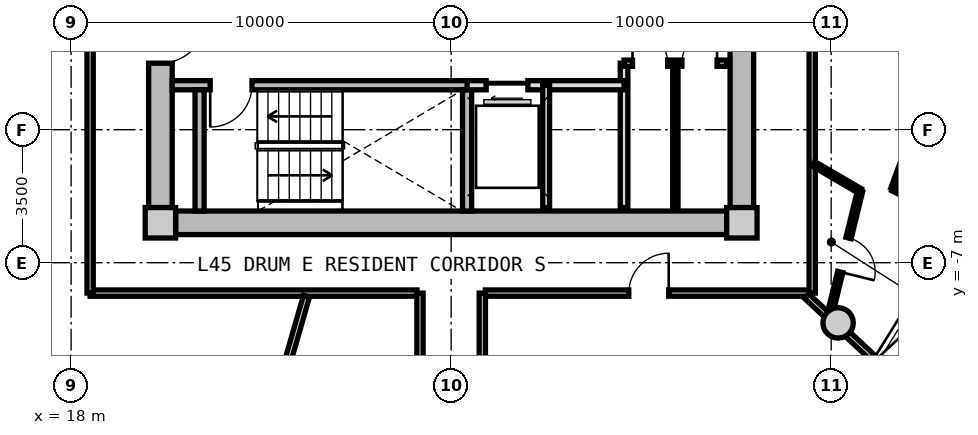
"""IFC4 building model, lengths in metres.
Left out: names, types, materials, properties, quantities, classifications, styles, units other than length and angle.
Written with IfcOpenShell. Run it as: python <this file> out.ifc"""

import sys

from ifc_helpers import new_model, si_unit, direction, frame, frame_2d, origin, origin_2d, place, context, subcontext, project, spatial, rectangle, circle, extrude, source, transform, mapped, element, fill, save


model = new_model("IFC4")
c1 = context("Model", 3, precision=1e-05, world=origin(), true_north=direction((0.0, 1.0)))
c2 = subcontext(c1, "Body", "Model", "MODEL_VIEW")
j1 = project(units=[si_unit("LENGTHUNIT", "METRE"), si_unit("PLANEANGLEUNIT", "RADIAN")], contexts=[c1])
p1 = place(None, origin())
s1 = spatial("IfcSite", under=j1, at=p1, CompositionType="ELEMENT")
p2 = place(p1, origin())
s2 = spatial("IfcBuilding", under=s1, at=p2, CompositionType="ELEMENT")
p3 = place(p2, frame((0.0, 0.0, 146.5)))
s3 = spatial("IfcBuildingStorey", under=s2, at=p3, CompositionType="ELEMENT", Elevation=146.5)
m1 = source(origin(), c2, "Body", "SweptSolid", [
    extrude(rectangle(XDim=0.8, YDim=0.8, at=origin_2d()), origin(), (0.0, 0.0, 1.0), 3.05),
])
for number, where, z_axis, x_axis in (
    (1, (20.35, -5.95, 0.0), (0.0, 0.0, 1.0), (1.0, 0.0, 0.0)),
    (2, (35.65, -5.95, 0.0), (0.0, 0.0, 1.0), (1.0, 0.0, 0.0)),
):
    element("IfcColumn", number, at=place(p3, frame(where, z_axis=z_axis, x_axis=x_axis)), inside=s3, PredefinedType="COLUMN", context=c2, shape_type="MappedRepresentation", body=[
        mapped(m1, transform((0.0, 0.0, 0.0), x_axis=(1.0, 0.0, 0.0), y_axis=(0.0, 1.0, 0.0), z_axis=(0.0, 0.0, 1.0), scale=1.0)),
    ])
m2 = source(origin(), c2, "Body", "SweptSolid", [
    extrude(rectangle(XDim=14.5, YDim=0.62, at=frame_2d((7.25, 0.0))), origin(), (0.0, 0.0, 1.0), 2.81),
])
p4 = place(p3, frame((35.25, -5.95, 0.0), z_axis=(0.0, 0.0, 1.0), x_axis=(-1.0, 0.0, 0.0)))
e3 = element("IfcWall", 3, at=p4, inside=s3, PredefinedType="SHEAR", context=c2, shape_type="MappedRepresentation", body=[
    mapped(m2, transform((0.0, 0.0, 0.0), x_axis=(1.0, 0.0, 0.0), y_axis=(0.0, 1.0, 0.0), z_axis=(0.0, 0.0, 1.0), scale=1.0)),
])
m3 = source(origin(), c2, "Body", "SweptSolid", [
    extrude(rectangle(XDim=11.1, YDim=0.62, at=frame_2d((5.55, 0.0))), origin(), (0.0, 0.0, 1.0), 2.81),
])
p5 = place(p3, frame((20.35, -5.55, 0.0), z_axis=(0.0, 0.0, 1.0), x_axis=(0.0, 1.0, 0.0)))
e4 = element("IfcWall", 4, at=p5, inside=s3, PredefinedType="SHEAR", context=c2, shape_type="MappedRepresentation", body=[
    mapped(m3, transform((0.0, 0.0, 0.0), x_axis=(1.0, 0.0, 0.0), y_axis=(0.0, 1.0, 0.0), z_axis=(0.0, 0.0, 1.0), scale=1.0)),
])
p6 = place(p5, frame((3.8, 0.0, 0.0)))
e5 = element("IfcOpeningElement", 5, at=p6, cuts=e4, PredefinedType="OPENING", context=c2, shape_type="SweptSolid", body=[
    extrude(rectangle(XDim=1.2, YDim=2.15, at=frame_2d((0.6, 1.075))), frame((0.0, 0.32, 0.0), z_axis=(0.0, -1.0, 0.0), x_axis=(1.0, 0.0, 0.0)), (0.0, 0.0, 1.0), 0.64),
])
p7 = place(p3, frame((35.65, 5.55, 0.0), z_axis=(0.0, 0.0, 1.0), x_axis=(0.0, -1.0, 0.0)))
e6 = element("IfcWall", 6, at=p7, inside=s3, PredefinedType="SHEAR", context=c2, shape_type="MappedRepresentation", body=[
    mapped(m3, transform((0.0, 0.0, 0.0), x_axis=(1.0, 0.0, 0.0), y_axis=(0.0, 1.0, 0.0), z_axis=(0.0, 0.0, 1.0), scale=1.0)),
])
p8 = place(p7, frame((5.65, 0.0, 0.0)))
e7 = element("IfcOpeningElement", 7, at=p8, cuts=e6, PredefinedType="OPENING", context=c2, shape_type="SweptSolid", body=[
    extrude(rectangle(XDim=1.2, YDim=2.15, at=frame_2d((0.6, 1.075))), frame((0.0, 0.32, 0.0), z_axis=(0.0, -1.0, 0.0), x_axis=(1.0, 0.0, 0.0)), (0.0, 0.0, 1.0), 0.64),
])
m4 = source(origin(), c2, "Body", "SweptSolid", [
    extrude(circle(Radius=0.4, at=origin_2d()), origin(), (0.0, 0.0, 1.0), 3.05),
])
p9 = place(p3, frame((38.183, -8.584, 0.0), z_axis=(0.0, 0.0, 1.0), x_axis=(1.0, 0.0, 0.0)))
e8 = element("IfcColumn", 8, at=p9, inside=s3, PredefinedType="COLUMN", context=c2, shape_type="MappedRepresentation", body=[
    mapped(m4, transform((0.0, 0.0, 0.0), x_axis=(1.0, 0.0, 0.0), y_axis=(0.0, 1.0, 0.0), z_axis=(0.0, 0.0, 1.0), scale=1.0)),
])
m5 = source(origin(), c2, "Body", "SweptSolid", [
    extrude(rectangle(XDim=7.88, YDim=0.24, at=frame_2d((3.94, 0.0))), origin(), (0.0, 0.0, 1.0), 2.81),
])
p10 = place(p3, frame((20.66, -2.33, 0.0), z_axis=(0.0, 0.0, 1.0), x_axis=(1.0, 0.0, 0.0)))
e9 = element("IfcWall", 9, at=p10, inside=s3, PredefinedType="PARTITIONING", context=c2, shape_type="MappedRepresentation", body=[
    mapped(m5, transform((0.0, 0.0, 0.0), x_axis=(1.0, 0.0, 0.0), y_axis=(0.0, 1.0, 0.0), z_axis=(0.0, 0.0, 1.0), scale=1.0)),
])
p11 = place(p10, frame((1.0, 0.0, 0.0)))
e10 = element("IfcOpeningElement", 10, at=p11, cuts=e9, PredefinedType="OPENING", context=c2, shape_type="SweptSolid", body=[
    extrude(rectangle(XDim=1.1, YDim=2.15, at=frame_2d((0.55, 1.075))), frame((0.0, 0.13, 0.0), z_axis=(0.0, -1.0, 0.0), x_axis=(1.0, 0.0, 0.0)), (0.0, 0.0, 1.0), 0.26),
])
m6 = source(origin(), c2, "Body", "SweptSolid", [
    extrude(rectangle(XDim=3.19, YDim=0.24, at=frame_2d((1.595, 0.0))), origin(), (0.0, 0.0, 1.0), 2.81),
])
for number, where, z_axis, x_axis in (
    (11, (21.38, -5.64, 0.0), (0.0, 0.0, 1.0), (0.0, 1.0, 0.0)),
    (12, (28.42, -5.64, 0.0), (0.0, 0.0, 1.0), (0.0, 1.0, 0.0)),
):
    element("IfcWall", number, at=place(p3, frame(where, z_axis=z_axis, x_axis=x_axis)), inside=s3, PredefinedType="PARTITIONING", context=c2, shape_type="MappedRepresentation", body=[
        mapped(m6, transform((0.0, 0.0, 0.0), x_axis=(1.0, 0.0, 0.0), y_axis=(0.0, 1.0, 0.0), z_axis=(0.0, 0.0, 1.0), scale=1.0)),
    ])
m7 = source(origin(), c2, "Body", "SweptSolid", [
    extrude(rectangle(XDim=3.8, YDim=0.2, at=frame_2d((1.9, 0.0))), origin(), (0.0, 0.0, 1.0), 2.795),
])
p12 = place(p3, frame((32.55, -5.55, 0.0), z_axis=(0.0, 0.0, 1.0), x_axis=(0.0, 1.0, 0.0)))
e13 = element("IfcWall", 13, at=p12, inside=s3, PredefinedType="PARTITIONING", context=c2, shape_type="MappedRepresentation", body=[
    mapped(m7, transform((0.0, 0.0, 0.0), x_axis=(1.0, 0.0, 0.0), y_axis=(0.0, 1.0, 0.0), z_axis=(0.0, 0.0, 1.0), scale=1.0)),
])
m8 = source(origin(), c2, "Body", "SweptSolid", [
    extrude(rectangle(XDim=4.13, YDim=0.24, at=frame_2d((2.065, 0.0))), origin(), (0.0, 0.0, 1.0), 2.795),
])
p13 = place(p3, frame((28.42, -2.33, 0.0), z_axis=(0.0, 0.0, 1.0), x_axis=(1.0, 0.0, 0.0)))
e14 = element("IfcWall", 14, at=p13, inside=s3, PredefinedType="PARTITIONING", context=c2, shape_type="MappedRepresentation", body=[
    mapped(m8, transform((0.0, 0.0, 0.0), x_axis=(1.0, 0.0, 0.0), y_axis=(0.0, 1.0, 0.0), z_axis=(0.0, 0.0, 1.0), scale=1.0)),
])
p14 = place(p13, frame((0.5, 0.0, 0.0)))
e15 = element("IfcOpeningElement", 15, at=p14, cuts=e14, PredefinedType="OPENING", context=c2, shape_type="SweptSolid", body=[
    extrude(rectangle(XDim=1.1, YDim=2.2, at=frame_2d((0.55, 1.1))), frame((0.0, 0.13, 0.0), z_axis=(0.0, -1.0, 0.0), x_axis=(1.0, 0.0, 0.0)), (0.0, 0.0, 1.0), 0.26),
])
m9 = source(origin(), c2, "Body", "SweptSolid", [
    extrude(rectangle(XDim=3.22, YDim=0.18, at=frame_2d((1.61, 0.0))), origin(), (0.0, 0.0, 1.0), 2.795),
])
p15 = place(p3, frame((30.5, -5.55, 0.0), z_axis=(0.0, 0.0, 1.0), x_axis=(0.0, 1.0, 0.0)))
e16 = element("IfcWall", 16, at=p15, inside=s3, PredefinedType="PARTITIONING", context=c2, shape_type="MappedRepresentation", body=[
    mapped(m9, transform((0.0, 0.0, 0.0), x_axis=(1.0, 0.0, 0.0), y_axis=(0.0, 1.0, 0.0), z_axis=(0.0, 0.0, 1.0), scale=1.0)),
])
m10 = source(origin(), c2, "Body", "SweptSolid", [
    extrude(rectangle(XDim=2.7, YDim=0.165, at=frame_2d((1.35, 0.0))), origin(), (0.0, 0.0, 1.0), 2.795),
])
p16 = place(p3, frame((32.55, -1.75, 0.0), z_axis=(0.0, 0.0, 1.0), x_axis=(1.0, 0.0, 0.0)))
e17 = element("IfcWall", 17, at=p16, inside=s3, PredefinedType="PARTITIONING", context=c2, shape_type="MappedRepresentation", body=[
    mapped(m10, transform((0.0, 0.0, 0.0), x_axis=(1.0, 0.0, 0.0), y_axis=(0.0, 1.0, 0.0), z_axis=(0.0, 0.0, 1.0), scale=1.0)),
])
p17 = place(p16, frame((0.222, 0.0, 0.0)))
e18 = element("IfcOpeningElement", 18, at=p17, cuts=e17, PredefinedType="OPENING", context=c2, shape_type="SweptSolid", body=[
    extrude(rectangle(XDim=0.925, YDim=2.1, at=frame_2d((0.462, 1.05))), frame((0.0, 0.093, 0.0), z_axis=(0.0, -1.0, 0.0), x_axis=(1.0, 0.0, 0.0)), (0.0, 0.0, 1.0), 0.185),
])
p18 = place(p16, frame((1.522, 0.0, 0.0)))
e19 = element("IfcOpeningElement", 19, at=p18, cuts=e17, PredefinedType="OPENING", context=c2, shape_type="SweptSolid", body=[
    extrude(rectangle(XDim=0.925, YDim=2.1, at=frame_2d((0.462, 1.05))), frame((0.0, 0.093, 0.0), z_axis=(0.0, -1.0, 0.0), x_axis=(1.0, 0.0, 0.0)), (0.0, 0.0, 1.0), 0.185),
])
m11 = source(origin(), c2, "Body", "SweptSolid", [
    extrude(rectangle(XDim=3.8, YDim=0.14, at=frame_2d((1.9, 0.0))), origin(), (0.0, 0.0, 1.0), 2.795),
])
p19 = place(p3, frame((33.9, -5.55, 0.0), z_axis=(0.0, 0.0, 1.0), x_axis=(0.0, 1.0, 0.0)))
e20 = element("IfcWall", 20, at=p19, inside=s3, PredefinedType="PARTITIONING", context=c2, shape_type="MappedRepresentation", body=[
    mapped(m11, transform((0.0, 0.0, 0.0), x_axis=(1.0, 0.0, 0.0), y_axis=(0.0, 1.0, 0.0), z_axis=(0.0, 0.0, 1.0), scale=1.0)),
])
m12 = source(origin(), c2, "Body", "SweptSolid", [
    extrude(rectangle(XDim=8.6, YDim=0.165, at=frame_2d((4.3, 0.0))), origin(), (0.0, 0.0, 1.0), 2.795),
])
p20 = place(p3, frame((37.5, -7.8, 0.0), z_axis=(0.0, 0.0, 1.0), x_axis=(-1.0, 0.0, 0.0)))
e21 = element("IfcWall", 21, at=p20, inside=s3, PredefinedType="PARTITIONING", context=c2, shape_type="MappedRepresentation", body=[
    mapped(m12, transform((0.0, 0.0, 0.0), x_axis=(1.0, 0.0, 0.0), y_axis=(0.0, 1.0, 0.0), z_axis=(0.0, 0.0, 1.0), scale=1.0)),
])
p21 = place(p20, frame((3.775, 0.0, 0.0)))
e22 = element("IfcOpeningElement", 22, at=p21, cuts=e21, PredefinedType="OPENING", context=c2, shape_type="SweptSolid", body=[
    extrude(rectangle(XDim=1.05, YDim=2.15, at=frame_2d((0.525, 1.075))), frame((0.0, 0.093, 0.0), z_axis=(0.0, -1.0, 0.0), x_axis=(1.0, 0.0, 0.0)), (0.0, 0.0, 1.0), 0.185),
])
p22 = place(p3, frame((27.1, -7.8, 0.0), z_axis=(0.0, 0.0, 1.0), x_axis=(-1.0, 0.0, 0.0)))
e23 = element("IfcWall", 23, at=p22, inside=s3, PredefinedType="PARTITIONING", context=c2, shape_type="MappedRepresentation", body=[
    mapped(m12, transform((0.0, 0.0, 0.0), x_axis=(1.0, 0.0, 0.0), y_axis=(0.0, 1.0, 0.0), z_axis=(0.0, 0.0, 1.0), scale=1.0)),
])
m13 = source(origin(), c2, "Body", "SweptSolid", [
    extrude(rectangle(XDim=15.6, YDim=0.165, at=frame_2d((7.8, 0.0))), origin(), (0.0, 0.0, 1.0), 2.795),
])
p23 = place(p3, frame((18.5, -7.8, 0.0), z_axis=(0.0, 0.0, 1.0), x_axis=(0.0, 1.0, 0.0)))
e24 = element("IfcWall", 24, at=p23, inside=s3, PredefinedType="PARTITIONING", context=c2, shape_type="MappedRepresentation", body=[
    mapped(m13, transform((0.0, 0.0, 0.0), x_axis=(1.0, 0.0, 0.0), y_axis=(0.0, 1.0, 0.0), z_axis=(0.0, 0.0, 1.0), scale=1.0)),
])
p24 = place(p23, frame((7.175, 0.0, 0.0)))
e25 = element("IfcOpeningElement", 25, at=p24, cuts=e24, PredefinedType="OPENING", context=c2, shape_type="SweptSolid", body=[
    extrude(rectangle(XDim=1.25, YDim=2.2, at=frame_2d((0.625, 1.1))), frame((0.0, 0.093, 0.0), z_axis=(0.0, -1.0, 0.0), x_axis=(1.0, 0.0, 0.0)), (0.0, 0.0, 1.0), 0.185),
])
p25 = place(p3, frame((37.5, 7.8, 0.0), z_axis=(0.0, 0.0, 1.0), x_axis=(0.0, -1.0, 0.0)))
e26 = element("IfcWall", 26, at=p25, inside=s3, PredefinedType="PARTITIONING", context=c2, shape_type="MappedRepresentation", body=[
    mapped(m13, transform((0.0, 0.0, 0.0), x_axis=(1.0, 0.0, 0.0), y_axis=(0.0, 1.0, 0.0), z_axis=(0.0, 0.0, 1.0), scale=1.0)),
])
p26 = place(p25, frame((5.687, 0.0, 0.0)))
e27 = element("IfcOpeningElement", 27, at=p26, cuts=e26, PredefinedType="OPENING", context=c2, shape_type="SweptSolid", body=[
    extrude(rectangle(XDim=1.05, YDim=2.15, at=frame_2d((0.525, 1.075))), frame((0.0, 0.093, 0.0), z_axis=(0.0, -1.0, 0.0), x_axis=(1.0, 0.0, 0.0)), (0.0, 0.0, 1.0), 0.185),
])
m14 = source(origin(), c2, "Body", "SweptSolid", [
    extrude(rectangle(XDim=6.035, YDim=0.165, at=frame_2d((3.018, 0.0))), origin(), (0.0, 0.0, 1.0), 2.345),
])
p27 = place(p3, frame((24.194, -7.88, 0.0), z_axis=(0.0, 0.0, 1.0), x_axis=(-0.276809454862, -0.960924828329, 0.0)))
e28 = element("IfcWall", 28, at=p27, inside=s3, PredefinedType="PARTITIONING", context=c2, shape_type="MappedRepresentation", body=[
    mapped(m14, transform((0.0, 0.0, 0.0), x_axis=(1.0, 0.0, 0.0), y_axis=(0.0, 1.0, 0.0), z_axis=(0.0, 0.0, 1.0), scale=1.0)),
])
m15 = source(origin(), c2, "Body", "SweptSolid", [
    extrude(rectangle(XDim=2.435, YDim=0.165, at=frame_2d((1.217, 0.0))), origin(), (0.0, 0.0, 1.0), 2.345),
])
p28 = place(p3, frame((37.354, -7.88, 0.0), z_axis=(0.0, 0.0, 1.0), x_axis=(0.732164643118, -0.681127693878, 0.0)))
e29 = element("IfcWall", 29, at=p28, inside=s3, PredefinedType="PARTITIONING", context=c2, shape_type="MappedRepresentation", body=[
    mapped(m15, transform((0.0, 0.0, 0.0), x_axis=(1.0, 0.0, 0.0), y_axis=(0.0, 1.0, 0.0), z_axis=(0.0, 0.0, 1.0), scale=1.0)),
])
m16 = source(origin(), c2, "Body", "SweptSolid", [
    extrude(rectangle(XDim=4.685, YDim=0.165, at=frame_2d((2.342, 0.0))), origin(), (0.0, 0.0, 1.0), 2.795),
])
p29 = place(p3, frame((27.18, -12.485, 0.0), z_axis=(0.0, 0.0, 1.0), x_axis=(0.0, 1.0, 0.0)))
e30 = element("IfcWall", 30, at=p29, inside=s3, PredefinedType="PARTITIONING", context=c2, shape_type="MappedRepresentation", body=[
    mapped(m16, transform((0.0, 0.0, 0.0), x_axis=(1.0, 0.0, 0.0), y_axis=(0.0, 1.0, 0.0), z_axis=(0.0, 0.0, 1.0), scale=1.0)),
])
p30 = place(p29, frame((1.817, 0.0, 0.0)))
e31 = element("IfcOpeningElement", 31, at=p30, cuts=e30, PredefinedType="OPENING", context=c2, shape_type="SweptSolid", body=[
    extrude(rectangle(XDim=1.05, YDim=2.15, at=frame_2d((0.525, 1.075))), frame((0.0, 0.093, 0.0), z_axis=(0.0, -1.0, 0.0), x_axis=(1.0, 0.0, 0.0)), (0.0, 0.0, 1.0), 0.185),
])
p31 = place(p3, frame((28.82, -12.485, 0.0), z_axis=(0.0, 0.0, 1.0), x_axis=(0.0, 1.0, 0.0)))
e32 = element("IfcWall", 32, at=p31, inside=s3, PredefinedType="PARTITIONING", context=c2, shape_type="MappedRepresentation", body=[
    mapped(m16, transform((0.0, 0.0, 0.0), x_axis=(1.0, 0.0, 0.0), y_axis=(0.0, 1.0, 0.0), z_axis=(0.0, 0.0, 1.0), scale=1.0)),
])
m17 = source(origin(), c2, "Body", "SweptSolid", [
    extrude(rectangle(XDim=1.425, YDim=0.14, at=frame_2d((0.712, 0.0))), origin(), (0.0, 0.0, 1.0), 2.795),
])
p32 = place(p3, frame((37.53, -4.396, 0.0), z_axis=(0.0, 0.0, 1.0), x_axis=(0.86324395577, -0.50478695786, 0.0)))
e33 = element("IfcWall", 33, at=p32, inside=s3, PredefinedType="PARTITIONING", context=c2, shape_type="MappedRepresentation", body=[
    mapped(m17, transform((0.0, 0.0, 0.0), x_axis=(1.0, 0.0, 0.0), y_axis=(0.0, 1.0, 0.0), z_axis=(0.0, 0.0, 1.0), scale=1.0)),
])
m18 = source(origin(), c2, "Body", "SweptSolid", [
    extrude(rectangle(XDim=3.464, YDim=0.14, at=frame_2d((1.732, 0.0))), origin(), (0.0, 0.0, 1.0), 2.795),
])
p33 = place(p3, frame((38.76, -5.115, 0.0), z_axis=(0.0, 0.0, 1.0), x_axis=(-0.238055968485, -0.971251438027, 0.0)))
e34 = element("IfcWall", 34, at=p33, inside=s3, PredefinedType="PARTITIONING", context=c2, shape_type="MappedRepresentation", body=[
    mapped(m18, transform((0.0, 0.0, 0.0), x_axis=(1.0, 0.0, 0.0), y_axis=(0.0, 1.0, 0.0), z_axis=(0.0, 0.0, 1.0), scale=1.0)),
])
p34 = place(p33, frame((1.272, 0.0, 0.0)))
e35 = element("IfcOpeningElement", 35, at=p34, cuts=e34, PredefinedType="OPENING", context=c2, shape_type="SweptSolid", body=[
    extrude(rectangle(XDim=0.92, YDim=2.1, at=frame_2d((0.46, 1.05))), frame((0.0, 0.08, 0.0), z_axis=(0.0, -1.0, 0.0), x_axis=(1.0, 0.0, 0.0)), (0.0, 0.0, 1.0), 0.16),
])
m19 = source(origin(), c2, "Body", "SweptSolid", [
    extrude(rectangle(XDim=1.957, YDim=0.115, at=frame_2d((0.979, 0.0))), origin(), (0.0, 0.0, 1.0), 2.795),
])
p35 = place(p3, frame((39.623, -5.057, 0.0), z_axis=(0.0, 0.0, 1.0), x_axis=(0.889228358674, -0.45746357902, 0.0)))
e36 = element("IfcWall", 36, at=p35, inside=s3, PredefinedType="PARTITIONING", context=c2, shape_type="MappedRepresentation", body=[
    mapped(m19, transform((0.0, 0.0, 0.0), x_axis=(1.0, 0.0, 0.0), y_axis=(0.0, 1.0, 0.0), z_axis=(0.0, 0.0, 1.0), scale=1.0)),
])
m20 = source(origin(), c2, "Body", "SweptSolid", [
    extrude(rectangle(XDim=3.571, YDim=0.115, at=frame_2d((1.786, 0.0))), origin(), (0.0, 0.0, 1.0), 2.795),
])
p36 = place(p3, frame((39.623, -5.057, 0.0), z_axis=(0.0, 0.0, 1.0), x_axis=(0.343515356993, 0.939147059576, 0.0)))
e37 = element("IfcWall", 37, at=p36, inside=s3, PredefinedType="PARTITIONING", context=c2, shape_type="MappedRepresentation", body=[
    mapped(m20, transform((0.0, 0.0, 0.0), x_axis=(1.0, 0.0, 0.0), y_axis=(0.0, 1.0, 0.0), z_axis=(0.0, 0.0, 1.0), scale=1.0)),
])
p37 = place(p36, frame((1.311, 0.0, 0.0)))
e38 = element("IfcOpeningElement", 38, at=p37, cuts=e37, PredefinedType="OPENING", context=c2, shape_type="SweptSolid", body=[
    extrude(rectangle(XDim=0.95, YDim=2.1, at=frame_2d((0.475, 1.05))), frame((0.0, 0.067, 0.0), z_axis=(0.0, -1.0, 0.0), x_axis=(1.0, 0.0, 0.0)), (0.0, 0.0, 1.0), 0.135),
])
m21 = source(origin(), c2, "Body", "SweptSolid", [
    extrude(rectangle(XDim=1.1, YDim=2.15, at=frame_2d((0.55, 1.075))), frame((0.0, 0.025, 0.0), z_axis=(0.0, -1.0, 0.0), x_axis=(1.0, 0.0, 0.0)), (0.0, 0.0, 1.0), 0.05),
])
p38 = place(p11, frame((1.1, 0.0, 0.0), z_axis=(0.0, 0.0, 1.0), x_axis=(-1.0, 0.0, 0.0)))
e39 = element("IfcDoor", 39, at=p38, inside=s3, OperationType="SINGLE_SWING_RIGHT", PredefinedType="DOOR", context=c2, shape_type="MappedRepresentation", body=[
    mapped(m21, transform((0.0, 0.0, 0.0), x_axis=(1.0, 0.0, 0.0), y_axis=(0.0, 1.0, 0.0), z_axis=(0.0, 0.0, 1.0), scale=1.0)),
])
fill(e10, e39)
m22 = source(origin(), c2, "Body", "SweptSolid", [
    extrude(rectangle(XDim=1.2, YDim=2.15, at=frame_2d((0.6, 1.075))), frame((0.0, 0.025, 0.0), z_axis=(0.0, -1.0, 0.0), x_axis=(1.0, 0.0, 0.0)), (0.0, 0.0, 1.0), 0.05),
])
p39 = place(p6, frame((1.2, 0.0, 0.0), z_axis=(0.0, 0.0, 1.0), x_axis=(-1.0, 0.0, 0.0)))
e40 = element("IfcDoor", 40, at=p39, inside=s3, OperationType="SINGLE_SWING_LEFT", PredefinedType="DOOR", context=c2, shape_type="MappedRepresentation", body=[
    mapped(m22, transform((0.0, 0.0, 0.0), x_axis=(1.0, 0.0, 0.0), y_axis=(0.0, 1.0, 0.0), z_axis=(0.0, 0.0, 1.0), scale=1.0)),
])
fill(e5, e40)
m23 = source(origin(), c2, "Body", "SweptSolid", [
    extrude(rectangle(XDim=1.1, YDim=2.2, at=frame_2d((0.55, 1.1))), frame((0.0, 0.025, 0.0), z_axis=(0.0, -1.0, 0.0), x_axis=(1.0, 0.0, 0.0)), (0.0, 0.0, 1.0), 0.05),
])
p40 = place(p14, frame((1.1, 0.0, 0.0), z_axis=(0.0, 0.0, 1.0), x_axis=(-1.0, 0.0, 0.0)))
e41 = element("IfcDoor", 41, at=p40, inside=s3, OperationType="SLIDING_TO_LEFT", PredefinedType="DOOR", context=c2, shape_type="MappedRepresentation", body=[
    mapped(m23, transform((0.0, 0.0, 0.0), x_axis=(1.0, 0.0, 0.0), y_axis=(0.0, 1.0, 0.0), z_axis=(0.0, 0.0, 1.0), scale=1.0)),
])
fill(e15, e41)
m24 = source(origin(), c2, "Body", "SweptSolid", [
    extrude(rectangle(XDim=0.925, YDim=2.1, at=frame_2d((0.462, 1.05))), frame((0.0, 0.025, 0.0), z_axis=(0.0, -1.0, 0.0), x_axis=(1.0, 0.0, 0.0)), (0.0, 0.0, 1.0), 0.05),
])
p41 = place(p17, origin())
e42 = element("IfcDoor", 42, at=p41, inside=s3, OperationType="SINGLE_SWING_LEFT", PredefinedType="DOOR", context=c2, shape_type="MappedRepresentation", body=[
    mapped(m24, transform((0.0, 0.0, 0.0), x_axis=(1.0, 0.0, 0.0), y_axis=(0.0, 1.0, 0.0), z_axis=(0.0, 0.0, 1.0), scale=1.0)),
])
fill(e18, e42)
p42 = place(p18, origin())
e43 = element("IfcDoor", 43, at=p42, inside=s3, OperationType="SINGLE_SWING_RIGHT", PredefinedType="DOOR", context=c2, shape_type="MappedRepresentation", body=[
    mapped(m24, transform((0.0, 0.0, 0.0), x_axis=(1.0, 0.0, 0.0), y_axis=(0.0, 1.0, 0.0), z_axis=(0.0, 0.0, 1.0), scale=1.0)),
])
fill(e19, e43)
m25 = source(origin(), c2, "Body", "SweptSolid", [
    extrude(rectangle(XDim=1.05, YDim=2.15, at=frame_2d((0.525, 1.075))), frame((0.0, 0.025, 0.0), z_axis=(0.0, -1.0, 0.0), x_axis=(1.0, 0.0, 0.0)), (0.0, 0.0, 1.0), 0.05),
])
p43 = place(p21, frame((1.05, 0.0, 0.0), z_axis=(0.0, 0.0, 1.0), x_axis=(-1.0, 0.0, 0.0)))
e44 = element("IfcDoor", 44, at=p43, inside=s3, OperationType="SINGLE_SWING_RIGHT", PredefinedType="DOOR", context=c2, shape_type="MappedRepresentation", body=[
    mapped(m25, transform((0.0, 0.0, 0.0), x_axis=(1.0, 0.0, 0.0), y_axis=(0.0, 1.0, 0.0), z_axis=(0.0, 0.0, 1.0), scale=1.0)),
])
fill(e22, e44)
m26 = source(origin(), c2, "Body", "SweptSolid", [
    extrude(rectangle(XDim=0.92, YDim=2.1, at=frame_2d((0.46, 1.05))), frame((0.0, 0.025, 0.0), z_axis=(0.0, -1.0, 0.0), x_axis=(1.0, 0.0, 0.0)), (0.0, 0.0, 1.0), 0.05),
])
p44 = place(p34, origin())
e45 = element("IfcDoor", 45, at=p44, inside=s3, OperationType="SINGLE_SWING_RIGHT", PredefinedType="DOOR", context=c2, shape_type="MappedRepresentation", body=[
    mapped(m26, transform((0.0, 0.0, 0.0), x_axis=(1.0, 0.0, 0.0), y_axis=(0.0, 1.0, 0.0), z_axis=(0.0, 0.0, 1.0), scale=1.0)),
])
fill(e35, e45)
save(model, sys.argv[1])
